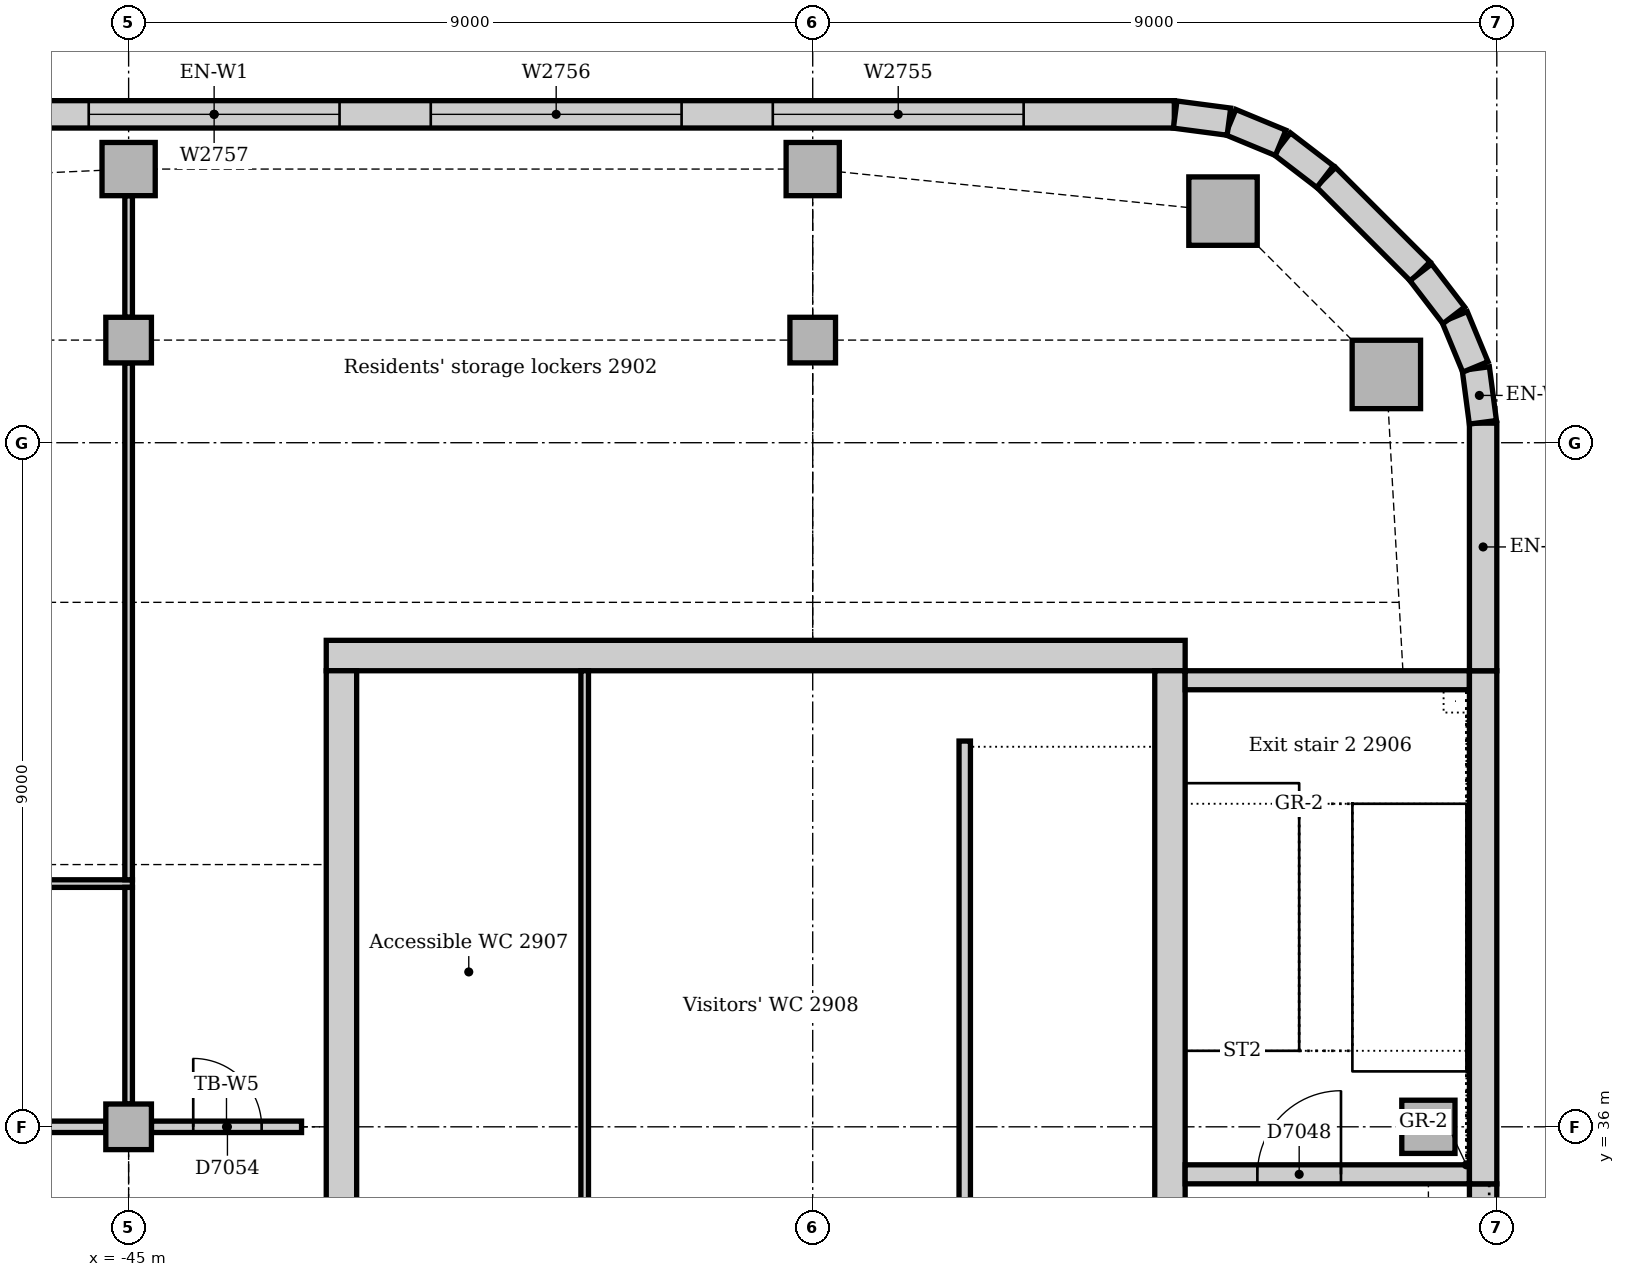
"""IFC4 building model, lengths in metres.
Left out: names, types, materials, properties, quantities, classifications, styles, units other than length and angle.
Written with IfcOpenShell. Run it as: python <this file> out.ifc"""

import sys

from ifc_helpers import new_model, si_unit, direction, frame, frame_2d, origin, origin_2d, place, context, subcontext, project, spatial, rectangle, extrude, element, fill, save


model = new_model("IFC4")
c1 = context("Model", 3, precision=1e-05, world=origin(), true_north=direction((0.0, 1.0)))
c2 = subcontext(c1, "Body", "Model", "MODEL_VIEW")
j1 = project(units=[si_unit("LENGTHUNIT", "METRE"), si_unit("PLANEANGLEUNIT", "RADIAN")], contexts=[c1])
p1 = place(None, origin())
s1 = spatial("IfcSite", under=j1, at=p1, CompositionType="ELEMENT")
p2 = place(p1, origin())
s2 = spatial("IfcBuilding", under=s1, at=p2, CompositionType="ELEMENT")
p3 = place(p2, frame((0.0, 0.0, 124.0)))
s3 = spatial("IfcBuildingStorey", under=s2, at=p3, CompositionType="ELEMENT", Elevation=124.0)
p4 = place(p3, frame((-31.1, 42.2, 0.0), z_axis=(0.0, 0.0, 1.0), x_axis=(-1.0, 0.0, 0.0)))
e1 = element("IfcWall", 1, at=p4, inside=s3, PredefinedType="SOLIDWALL", context=c2, shape_type="SweptSolid", body=[
    extrude(rectangle(XDim=11.3, YDim=0.4, at=frame_2d((5.65, 0.0))), origin(), (0.0, 0.0, 1.0), 4.0),
])
p5 = place(p3, frame((-31.3, 30.5, 0.0), z_axis=(0.0, 0.0, 1.0), x_axis=(0.0, 1.0, 0.0)))
e2 = element("IfcWall", 2, at=p5, inside=s3, PredefinedType="SOLIDWALL", context=c2, shape_type="SweptSolid", body=[
    extrude(rectangle(XDim=11.5, YDim=0.4, at=frame_2d((5.75, 0.0))), origin(), (0.0, 0.0, 1.0), 4.0),
])
p6 = place(p5, frame((0.85, 0.0, 0.0)))
e3 = element("IfcOpeningElement", 3, at=p6, cuts=e2, PredefinedType="OPENING", context=c2, shape_type="SweptSolid", body=[
    extrude(rectangle(XDim=1.8, YDim=2.1, at=frame_2d((0.9, 1.05))), frame((0.0, 0.21, 0.0), z_axis=(0.0, -1.0, 0.0), x_axis=(1.0, 0.0, 0.0)), (0.0, 0.0, 1.0), 0.42),
])
p7 = place(p3, frame((-42.2, 42.0, 0.0), z_axis=(0.0, 0.0, 1.0), x_axis=(0.0, -1.0, 0.0)))
e4 = element("IfcWall", 4, at=p7, inside=s3, PredefinedType="SOLIDWALL", context=c2, shape_type="SweptSolid", body=[
    extrude(rectangle(XDim=11.5, YDim=0.4, at=frame_2d((5.75, 0.0))), origin(), (0.0, 0.0, 1.0), 4.0),
])
p8 = place(p7, frame((8.85, 0.0, 0.0)))
e5 = element("IfcOpeningElement", 5, at=p8, cuts=e4, PredefinedType="OPENING", context=c2, shape_type="SweptSolid", body=[
    extrude(rectangle(XDim=1.8, YDim=2.1, at=frame_2d((0.9, 1.05))), frame((0.0, 0.21, 0.0), z_axis=(0.0, -1.0, 0.0), x_axis=(1.0, 0.0, 0.0)), (0.0, 0.0, 1.0), 0.42),
])
p9 = place(p3, frame((-31.1, 35.375, 0.0), z_axis=(0.0, 0.0, 1.0), x_axis=(1.0, 0.0, 0.0)))
e6 = element("IfcWall", 6, at=p9, inside=s3, PredefinedType="SOLIDWALL", context=c2, shape_type="SweptSolid", body=[
    extrude(rectangle(XDim=3.74, YDim=0.25, at=frame_2d((1.87, 0.0))), origin(), (0.0, 0.0, 1.0), 4.0),
])
p10 = place(p9, frame((0.95, 0.0, 0.0)))
e7 = element("IfcOpeningElement", 7, at=p10, cuts=e6, PredefinedType="OPENING", context=c2, shape_type="SweptSolid", body=[
    extrude(rectangle(XDim=1.1, YDim=2.1, at=frame_2d((0.55, 1.05))), frame((0.0, 0.135, 0.0), z_axis=(0.0, -1.0, 0.0), x_axis=(1.0, 0.0, 0.0)), (0.0, 0.0, 1.0), 0.27),
])
p11 = place(p3, frame((-27.36, 41.875, 0.0), z_axis=(0.0, 0.0, 1.0), x_axis=(-1.0, 0.0, 0.0)))
e8 = element("IfcWall", 8, at=p11, inside=s3, PredefinedType="SOLIDWALL", context=c2, shape_type="SweptSolid", body=[
    extrude(rectangle(XDim=3.74, YDim=0.25, at=frame_2d((1.87, 0.0))), origin(), (0.0, 0.0, 1.0), 4.0),
])
for number, where, z_axis, x_axis in (
    (9, (-28.453, 45.898, 0.0), (0.0, 0.0, 1.0), (1.0, 0.0, 0.0)),
    (10, (-30.602, 48.047, 0.0), (0.0, 0.0, 1.0), (1.0, 0.0, 0.0)),
):
    element("IfcColumn", number, at=place(p3, frame(where, z_axis=z_axis, x_axis=x_axis)), inside=s3, PredefinedType="COLUMN", context=c2, shape_type="SweptSolid", body=[
        extrude(rectangle(XDim=0.9, YDim=0.9, at=origin_2d()), origin(), (0.0, 0.0, 1.0), 3.85),
    ])
p12 = place(p3, frame((-27.9, 36.0, 0.0), z_axis=(0.0, 0.0, 1.0), x_axis=(1.0, 0.0, 0.0)))
e11 = element("IfcColumn", 11, at=p12, inside=s3, PredefinedType="COLUMN", context=c2, shape_type="SweptSolid", body=[
    extrude(rectangle(XDim=0.7, YDim=0.7, at=origin_2d()), origin(), (0.0, 0.0, 1.0), 4.0),
])
for number, where, z_axis, x_axis in (
    (12, (-45.0, 48.6, 0.0), (0.0, 0.0, 1.0), (1.0, 0.0, 0.0)),
    (13, (-36.0, 48.6, 0.0), (0.0, 0.0, 1.0), (1.0, 0.0, 0.0)),
):
    element("IfcColumn", number, at=place(p3, frame(where, z_axis=z_axis, x_axis=x_axis)), inside=s3, PredefinedType="COLUMN", context=c2, shape_type="SweptSolid", body=[
        extrude(rectangle(XDim=0.7, YDim=0.7, at=origin_2d()), origin(), (0.0, 0.0, 1.0), 3.85),
    ])
for number, where, z_axis, x_axis in (
    (14, (-45.0, 36.0, 0.0), (0.0, 0.0, 1.0), (1.0, 0.0, 0.0)),
    (15, (-45.0, 46.35, 0.0), (0.0, 0.0, 1.0), (1.0, 0.0, 0.0)),
    (16, (-36.0, 46.35, 0.0), (0.0, 0.0, 1.0), (1.0, 0.0, 0.0)),
):
    element("IfcColumn", number, at=place(p3, frame(where, z_axis=z_axis, x_axis=x_axis)), inside=s3, PredefinedType="COLUMN", context=c2, shape_type="SweptSolid", body=[
        extrude(rectangle(XDim=0.6, YDim=0.6, at=origin_2d()), origin(), (0.0, 0.0, 1.0), 3.85),
    ])
p13 = place(p3, frame((-27.18, 27.75, 0.0), z_axis=(0.0, 0.0, 1.0), x_axis=(0.0, 1.0, 0.0)))
e17 = element("IfcWall", 17, at=p13, inside=s3, PredefinedType="STANDARD", context=c2, shape_type="SweptSolid", body=[
    extrude(rectangle(XDim=7.5, YDim=0.36, at=frame_2d((3.75, 0.0))), origin(), (0.0, 0.0, 1.0), 3.85),
])
p14 = place(p13, frame((2.85, 0.0, 1.2)))
e18 = element("IfcOpeningElement", 18, at=p14, cuts=e17, PredefinedType="OPENING", context=c2, shape_type="SweptSolid", body=[
    extrude(rectangle(XDim=1.8, YDim=1.2, at=frame_2d((0.9, 0.6))), frame((0.0, 0.19, 0.0), z_axis=(0.0, -1.0, 0.0), x_axis=(1.0, 0.0, 0.0)), (0.0, 0.0, 1.0), 0.38),
])
p15 = place(p3, frame((-27.18, 35.25, 0.0), z_axis=(0.0, 0.0, 1.0), x_axis=(0.0, 1.0, 0.0)))
e19 = element("IfcWall", 19, at=p15, inside=s3, PredefinedType="STANDARD", context=c2, shape_type="SweptSolid", body=[
    extrude(rectangle(XDim=6.75, YDim=0.36, at=frame_2d((3.375, 0.0))), origin(), (0.0, 0.0, 1.0), 3.85),
])
p16 = place(p3, frame((-27.18, 42.0, 0.0), z_axis=(0.0, 0.0, 1.0), x_axis=(0.0, 1.0, 0.0)))
e20 = element("IfcWall", 20, at=p16, inside=s3, PredefinedType="STANDARD", context=c2, shape_type="SweptSolid", body=[
    extrude(rectangle(XDim=3.257, YDim=0.36, at=frame_2d((1.629, 0.0))), origin(), (0.0, 0.0, 1.0), 3.85),
])
p17 = place(p3, frame((-28.006, 47.251, 0.0), z_axis=(0.0, 0.0, 1.0), x_axis=(-0.707106781187, 0.707106781187, 0.0)))
e21 = element("IfcWall", 21, at=p17, inside=s3, PredefinedType="STANDARD", context=c2, shape_type="SweptSolid", body=[
    extrude(rectangle(XDim=1.757, YDim=0.36, at=frame_2d((0.879, 0.0))), origin(), (0.0, 0.0, 1.0), 3.85),
])
p18 = place(p3, frame((-31.243, 49.32, 0.0), z_axis=(0.0, 0.0, 1.0), x_axis=(-1.0, 0.0, 0.0)))
e22 = element("IfcWall", 22, at=p18, inside=s3, PredefinedType="STANDARD", context=c2, shape_type="SweptSolid", body=[
    extrude(rectangle(XDim=25.265, YDim=0.36, at=frame_2d((12.632, 0.0))), origin(), (0.0, 0.0, 1.0), 3.85),
])
p19 = place(p18, frame((1.982, 0.0, 0.9)))
e23 = element("IfcOpeningElement", 23, at=p19, cuts=e22, PredefinedType="OPENING", context=c2, shape_type="SweptSolid", body=[
    extrude(rectangle(XDim=3.3, YDim=1.6, at=frame_2d((1.65, 0.8))), frame((0.0, 0.19, 0.0), z_axis=(0.0, -1.0, 0.0), x_axis=(1.0, 0.0, 0.0)), (0.0, 0.0, 1.0), 0.38),
])
p20 = place(p18, frame((6.482, 0.0, 0.9)))
e24 = element("IfcOpeningElement", 24, at=p20, cuts=e22, PredefinedType="OPENING", context=c2, shape_type="SweptSolid", body=[
    extrude(rectangle(XDim=3.3, YDim=1.6, at=frame_2d((1.65, 0.8))), frame((0.0, 0.19, 0.0), z_axis=(0.0, -1.0, 0.0), x_axis=(1.0, 0.0, 0.0)), (0.0, 0.0, 1.0), 0.38),
])
p21 = place(p18, frame((10.982, 0.0, 0.9)))
e25 = element("IfcOpeningElement", 25, at=p21, cuts=e22, PredefinedType="OPENING", context=c2, shape_type="SweptSolid", body=[
    extrude(rectangle(XDim=3.3, YDim=1.6, at=frame_2d((1.65, 0.8))), frame((0.0, 0.19, 0.0), z_axis=(0.0, -1.0, 0.0), x_axis=(1.0, 0.0, 0.0)), (0.0, 0.0, 1.0), 0.38),
])
p22 = place(p18, frame((15.482, 0.0, 0.9)))
e26 = element("IfcOpeningElement", 26, at=p22, cuts=e22, PredefinedType="OPENING", context=c2, shape_type="SweptSolid", body=[
    extrude(rectangle(XDim=3.3, YDim=1.6, at=frame_2d((1.65, 0.8))), frame((0.0, 0.19, 0.0), z_axis=(0.0, -1.0, 0.0), x_axis=(1.0, 0.0, 0.0)), (0.0, 0.0, 1.0), 0.38),
])
p23 = place(p18, frame((19.982, 0.0, 0.9)))
e27 = element("IfcOpeningElement", 27, at=p23, cuts=e22, PredefinedType="OPENING", context=c2, shape_type="SweptSolid", body=[
    extrude(rectangle(XDim=3.3, YDim=1.6, at=frame_2d((1.65, 0.8))), frame((0.0, 0.19, 0.0), z_axis=(0.0, -1.0, 0.0), x_axis=(1.0, 0.0, 0.0)), (0.0, 0.0, 1.0), 0.38),
])
for number, where, z_axis, x_axis in (
    (28, (-27.183, 45.269, 0.0), (0.0, 0.0, 1.0), (-0.131, 0.991, 0.0)),
    (29, (-27.282, 45.997, 0.0), (0.0, 0.0, 1.0), (-0.383, 0.924, 0.0)),
):
    element("IfcWall", number, at=place(p3, frame(where, z_axis=z_axis, x_axis=x_axis)), inside=s3, PredefinedType="STANDARD", context=c2, shape_type="SweptSolid", body=[
        extrude(rectangle(XDim=0.713, YDim=0.36, at=frame_2d((0.356, 0.0))), origin(), (0.0, 0.0, 1.0), 3.85),
    ])
for number, where, z_axis, x_axis in (
    (30, (-27.566, 46.675, 0.0), (0.0, 0.0, 1.0), (-0.609, 0.793, 0.0)),
    (31, (-29.259, 48.5, 0.0), (0.0, 0.0, 1.0), (-0.793, 0.609, 0.0)),
):
    element("IfcWall", number, at=place(p3, frame(where, z_axis=z_axis, x_axis=x_axis)), inside=s3, PredefinedType="STANDARD", context=c2, shape_type="SweptSolid", body=[
        extrude(rectangle(XDim=0.713, YDim=0.36, at=frame_2d((0.357, 0.0))), origin(), (0.0, 0.0, 1.0), 3.85),
    ])
for number, where, z_axis, x_axis in (
    (32, (-29.844, 48.945, 0.0), (0.0, 0.0, 1.0), (-0.924, 0.383, 0.0)),
    (33, (-30.524, 49.224, 0.0), (0.0, 0.0, 1.0), (-0.991, 0.131, 0.0)),
):
    element("IfcWall", number, at=place(p3, frame(where, z_axis=z_axis, x_axis=x_axis)), inside=s3, PredefinedType="STANDARD", context=c2, shape_type="SweptSolid", body=[
        extrude(rectangle(XDim=0.713, YDim=0.36, at=frame_2d((0.356, 0.0))), origin(), (0.0, 0.0, 1.0), 3.85),
    ])
p24 = place(p3, frame((-34.0, 41.075, 0.0), z_axis=(0.0, 0.0, 1.0), x_axis=(0.0, -1.0, 0.0)))
e34 = element("IfcWall", 34, at=p24, inside=s3, PredefinedType="SOLIDWALL", context=c2, shape_type="SweptSolid", body=[
    extrude(rectangle(XDim=7.0, YDim=0.15, at=frame_2d((3.5, 0.0))), origin(), (0.0, 0.0, 1.0), 4.0),
])
p25 = place(p3, frame((-39.0, 34.075, 0.0), z_axis=(0.0, 0.0, 1.0), x_axis=(0.0, 1.0, 0.0)))
e35 = element("IfcWall", 35, at=p25, inside=s3, PredefinedType="PARTITIONING", context=c2, shape_type="SweptSolid", body=[
    extrude(rectangle(XDim=7.925, YDim=0.1, at=frame_2d((3.962, 0.0))), origin(), (0.0, 0.0, 1.0), 3.85),
])
p26 = place(p3, frame((-44.7, 36.0, 0.0), z_axis=(0.0, 0.0, 1.0), x_axis=(1.0, 0.0, 0.0)))
e36 = element("IfcWall", 36, at=p26, inside=s3, PredefinedType="PARTITIONING", context=c2, shape_type="SweptSolid", body=[
    extrude(rectangle(XDim=1.975, YDim=0.15, at=frame_2d((0.988, 0.0))), origin(), (0.0, 0.0, 1.0), 3.602),
])
p27 = place(p26, frame((0.55, 0.0, 0.0)))
e37 = element("IfcOpeningElement", 37, at=p27, cuts=e36, PredefinedType="OPENING", context=c2, shape_type="SweptSolid", body=[
    extrude(rectangle(XDim=0.9, YDim=2.1, at=frame_2d((0.45, 1.05))), frame((0.0, 0.085, 0.0), z_axis=(0.0, -1.0, 0.0), x_axis=(1.0, 0.0, 0.0)), (0.0, 0.0, 1.0), 0.17),
])
p28 = place(p3, frame((-53.7, 36.0, 0.0), z_axis=(0.0, 0.0, 1.0), x_axis=(1.0, 0.0, 0.0)))
e38 = element("IfcWall", 38, at=p28, inside=s3, PredefinedType="PARTITIONING", context=c2, shape_type="SweptSolid", body=[
    extrude(rectangle(XDim=8.4, YDim=0.15, at=frame_2d((4.2, 0.0))), origin(), (0.0, 0.0, 1.0), 3.262),
])
p29 = place(p28, frame((0.3, 0.0, 0.0)))
e39 = element("IfcOpeningElement", 39, at=p29, cuts=e38, PredefinedType="OPENING", context=c2, shape_type="SweptSolid", body=[
    extrude(rectangle(XDim=1.0, YDim=2.1, at=frame_2d((0.5, 1.05))), frame((0.0, 0.085, 0.0), z_axis=(0.0, -1.0, 0.0), x_axis=(1.0, 0.0, 0.0)), (0.0, 0.0, 1.0), 0.17),
])
p30 = place(p3, frame((-60.39, 39.2, 0.0), z_axis=(0.0, 0.0, 1.0), x_axis=(1.0, 0.0, 0.0)))
e40 = element("IfcWall", 40, at=p30, inside=s3, PredefinedType="PARTITIONING", context=c2, shape_type="SweptSolid", body=[
    extrude(rectangle(XDim=15.44, YDim=0.1, at=frame_2d((7.72, 0.0))), origin(), (0.0, 0.0, 1.0), 3.85),
])
p31 = place(p30, frame((6.021, 0.0, 0.0)))
e41 = element("IfcOpeningElement", 41, at=p31, cuts=e40, PredefinedType="OPENING", context=c2, shape_type="SweptSolid", body=[
    extrude(rectangle(XDim=0.9, YDim=2.1, at=frame_2d((0.45, 1.05))), frame((0.0, 0.06, 0.0), z_axis=(0.0, -1.0, 0.0), x_axis=(1.0, 0.0, 0.0)), (0.0, 0.0, 1.0), 0.12),
])
p32 = place(p3, frame((-45.0, 39.25, 0.0), z_axis=(0.0, 0.0, 1.0), x_axis=(0.0, 1.0, 0.0)))
e42 = element("IfcWall", 42, at=p32, inside=s3, PredefinedType="PARTITIONING", context=c2, shape_type="SweptSolid", body=[
    extrude(rectangle(XDim=6.8, YDim=0.1, at=frame_2d((3.4, 0.0))), origin(), (0.0, 0.0, 1.0), 3.362),
])
p33 = place(p3, frame((-45.0, 36.3, 0.0), z_axis=(0.0, 0.0, 1.0), x_axis=(0.0, 1.0, 0.0)))
e43 = element("IfcWall", 43, at=p33, inside=s3, PredefinedType="PARTITIONING", context=c2, shape_type="SweptSolid", body=[
    extrude(rectangle(XDim=2.85, YDim=0.1, at=frame_2d((1.425, 0.0))), origin(), (0.0, 0.0, 1.0), 3.362),
])
p34 = place(p3, frame((-45.0, 46.65, 0.0), z_axis=(0.0, 0.0, 1.0), x_axis=(0.0, 1.0, 0.0)))
e44 = element("IfcWall", 44, at=p34, inside=s3, PredefinedType="PARTITIONING", context=c2, shape_type="SweptSolid", body=[
    extrude(rectangle(XDim=1.6, YDim=0.1, at=frame_2d((0.8, 0.0))), origin(), (0.0, 0.0, 1.0), 3.652),
])
p35 = place(p19, origin())
e45 = element("IfcWindow", 45, at=p35, inside=s3, PartitioningType="SINGLE_PANEL", PredefinedType="WINDOW", context=c2, shape_type="SweptSolid", body=[
    extrude(rectangle(XDim=3.3, YDim=1.6, at=frame_2d((1.65, 0.8))), frame((0.0, 0.13, 0.0), z_axis=(0.0, -1.0, 0.0), x_axis=(1.0, 0.0, 0.0)), (0.0, 0.0, 1.0), 0.06),
])
fill(e23, e45)
p36 = place(p20, origin())
e46 = element("IfcWindow", 46, at=p36, inside=s3, PartitioningType="SINGLE_PANEL", PredefinedType="WINDOW", context=c2, shape_type="SweptSolid", body=[
    extrude(rectangle(XDim=3.3, YDim=1.6, at=frame_2d((1.65, 0.8))), frame((0.0, 0.13, 0.0), z_axis=(0.0, -1.0, 0.0), x_axis=(1.0, 0.0, 0.0)), (0.0, 0.0, 1.0), 0.06),
])
fill(e24, e46)
p37 = place(p21, origin())
e47 = element("IfcWindow", 47, at=p37, inside=s3, PartitioningType="SINGLE_PANEL", PredefinedType="WINDOW", context=c2, shape_type="SweptSolid", body=[
    extrude(rectangle(XDim=3.3, YDim=1.6, at=frame_2d((1.65, 0.8))), frame((0.0, 0.13, 0.0), z_axis=(0.0, -1.0, 0.0), x_axis=(1.0, 0.0, 0.0)), (0.0, 0.0, 1.0), 0.06),
])
fill(e25, e47)
p38 = place(p10, origin())
e48 = element("IfcDoor", 48, at=p38, inside=s3, OperationType="SINGLE_SWING_RIGHT", PredefinedType="DOOR", context=c2, shape_type="SweptSolid", body=[
    extrude(rectangle(XDim=1.1, YDim=2.1, at=frame_2d((0.55, 1.05))), frame((0.0, 0.025, 0.0), z_axis=(0.0, -1.0, 0.0), x_axis=(1.0, 0.0, 0.0)), (0.0, 0.0, 1.0), 0.05),
])
fill(e7, e48)
p39 = place(p27, origin())
e49 = element("IfcDoor", 49, at=p39, inside=s3, OperationType="SINGLE_SWING_LEFT", PredefinedType="DOOR", context=c2, shape_type="SweptSolid", body=[
    extrude(rectangle(XDim=0.9, YDim=2.1, at=frame_2d((0.45, 1.05))), frame((0.0, 0.025, 0.0), z_axis=(0.0, -1.0, 0.0), x_axis=(1.0, 0.0, 0.0)), (0.0, 0.0, 1.0), 0.05),
])
fill(e37, e49)
save(model, sys.argv[1])
